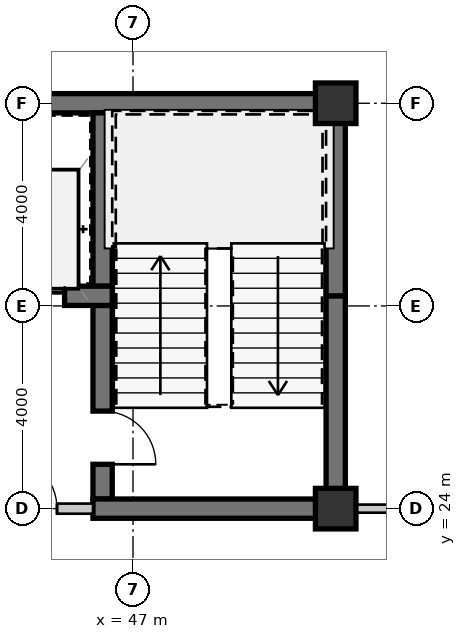
"""IFC4 building model, lengths in metres.
Left out: names, types, materials, properties, quantities, classifications, styles, units other than length and angle.
Written with IfcOpenShell. Run it as: python <this file> out.ifc"""

import sys

from ifc_helpers import new_model, si_unit, direction, frame, frame_2d, origin, origin_2d, place, context, subcontext, project, spatial, rectangle, extrude, source, transform, mapped, element, fill, save


model = new_model("IFC4")
c1 = context("Model", 3, precision=1e-05, world=origin(), true_north=direction((0.0, 1.0)))
c2 = subcontext(c1, "Body", "Model", "MODEL_VIEW")
j1 = project(units=[si_unit("LENGTHUNIT", "METRE"), si_unit("PLANEANGLEUNIT", "RADIAN")], contexts=[c1])
p1 = place(None, origin())
s1 = spatial("IfcSite", under=j1, at=p1, CompositionType="ELEMENT")
p2 = place(p1, origin())
s2 = spatial("IfcBuilding", under=s1, at=p2, CompositionType="ELEMENT")
p3 = place(p2, frame((0.0, 0.0, 57.75)))
s3 = spatial("IfcBuildingStorey", under=s2, at=p3, CompositionType="ELEMENT", Elevation=57.75)
m1 = source(origin(), c2, "Body", "SweptSolid", [
    extrude(rectangle(XDim=0.8, YDim=0.8, at=origin_2d()), origin(), (0.0, 0.0, 1.0), 3.15),
])
for number, where, z_axis, x_axis in (
    (1, (51.0, 24.0, 0.0), (0.0, 0.0, 1.0), (1.0, 0.0, 0.0)),
    (2, (51.0, 32.0, 0.0), (0.0, 0.0, 1.0), (1.0, 0.0, 0.0)),
):
    element("IfcColumn", number, at=place(p3, frame(where, z_axis=z_axis, x_axis=x_axis)), inside=s3, PredefinedType="COLUMN", context=c2, shape_type="MappedRepresentation", body=[
        mapped(m1, transform((0.0, 0.0, 0.0), scale=1.0)),
    ])
m2 = source(origin(), c2, "Body", "SweptSolid", [
    extrude(rectangle(XDim=11.99, YDim=0.38, at=frame_2d((5.995, 0.0))), origin(), (0.0, 0.0, 1.0), 2.87),
])
p4 = place(p3, frame((39.2, 32.0, 0.0), z_axis=(0.0, 0.0, 1.0), x_axis=(1.0, 0.0, 0.0)))
e3 = element("IfcWall", 3, at=p4, inside=s3, PredefinedType="SHEAR", context=c2, shape_type="MappedRepresentation", body=[
    mapped(m2, transform((0.0, 0.0, 0.0), scale=1.0)),
])
m3 = source(origin(), c2, "Body", "SweptSolid", [
    extrude(rectangle(XDim=4.01, YDim=0.38, at=frame_2d((2.005, 0.0))), origin(), (0.0, 0.0, 1.0), 2.87),
])
p5 = place(p3, frame((51.0, 24.19, 0.0), z_axis=(0.0, 0.0, 1.0), x_axis=(0.0, 1.0, 0.0)))
e4 = element("IfcWall", 4, at=p5, inside=s3, PredefinedType="SHEAR", context=c2, shape_type="MappedRepresentation", body=[
    mapped(m3, transform((0.0, 0.0, 0.0), scale=1.0)),
])
m4 = source(origin(), c2, "Body", "SweptSolid", [
    extrude(rectangle(XDim=3.61, YDim=0.38, at=frame_2d((1.805, 0.0))), origin(), (0.0, 0.0, 1.0), 2.87),
])
p6 = place(p3, frame((51.0, 28.2, 0.0), z_axis=(0.0, 0.0, 1.0), x_axis=(0.0, 1.0, 0.0)))
e5 = element("IfcWall", 5, at=p6, inside=s3, PredefinedType="SHEAR", context=c2, shape_type="MappedRepresentation", body=[
    mapped(m4, transform((0.0, 0.0, 0.0), scale=1.0)),
])
m5 = source(origin(), c2, "Body", "SweptSolid", [
    extrude(rectangle(XDim=3.42, YDim=0.38, at=frame_2d((1.71, 0.0))), origin(), (0.0, 0.0, 1.0), 2.87),
])
p7 = place(p3, frame((46.4, 31.81, 0.0), z_axis=(0.0, 0.0, 1.0), x_axis=(0.0, -1.0, 0.0)))
e6 = element("IfcWall", 6, at=p7, inside=s3, PredefinedType="SHEAR", context=c2, shape_type="MappedRepresentation", body=[
    mapped(m5, transform((0.0, 0.0, 0.0), scale=1.0)),
])
m6 = source(origin(), c2, "Body", "SweptSolid", [
    extrude(rectangle(XDim=3.82, YDim=0.38, at=frame_2d((1.91, 0.0))), origin(), (0.0, 0.0, 1.0), 2.87),
])
p8 = place(p3, frame((46.4, 28.01, 0.0), z_axis=(0.0, 0.0, 1.0), x_axis=(0.0, -1.0, 0.0)))
e7 = element("IfcWall", 7, at=p8, inside=s3, PredefinedType="SHEAR", context=c2, shape_type="MappedRepresentation", body=[
    mapped(m6, transform((0.0, 0.0, 0.0), scale=1.0)),
])
m7 = source(origin(), c2, "Body", "SweptSolid", [
    extrude(rectangle(XDim=1.05, YDim=2.1, at=frame_2d((0.525, 1.05))), frame((0.0, 0.2, 0.0), z_axis=(0.0, -1.0, 0.0), x_axis=(1.0, 0.0, 0.0)), (0.0, 0.0, 1.0), 0.4),
])
p9 = place(p8, frame((2.085, 0.0, 0.0)))
e8 = element("IfcOpeningElement", 8, at=p9, cuts=e7, PredefinedType="OPENING", context=c2, shape_type="MappedRepresentation", body=[
    mapped(m7, transform((0.0, 0.0, 0.0), scale=1.0)),
])
m8 = source(origin(), c2, "Body", "SweptSolid", [
    extrude(rectangle(XDim=4.98, YDim=0.38, at=frame_2d((2.49, 0.0))), origin(), (0.0, 0.0, 1.0), 2.87),
])
p10 = place(p3, frame((46.21, 24.0, 0.0), z_axis=(0.0, 0.0, 1.0), x_axis=(1.0, 0.0, 0.0)))
e9 = element("IfcWall", 9, at=p10, inside=s3, PredefinedType="SHEAR", context=c2, shape_type="MappedRepresentation", body=[
    mapped(m8, transform((0.0, 0.0, 0.0), scale=1.0)),
])
m9 = source(origin(), c2, "Body", "SweptSolid", [
    extrude(rectangle(XDim=2.98, YDim=0.38, at=frame_2d((1.49, 0.0))), origin(), (0.0, 0.0, 1.0), 2.87),
])
p11 = place(p3, frame((43.61, 28.2, 0.0), z_axis=(0.0, 0.0, 1.0), x_axis=(1.0, 0.0, 0.0)))
e10 = element("IfcWall", 10, at=p11, inside=s3, PredefinedType="SHEAR", context=c2, shape_type="MappedRepresentation", body=[
    mapped(m9, transform((0.0, 0.0, 0.0), scale=1.0)),
])
m10 = source(origin(), c2, "Body", "SweptSolid", [
    extrude(rectangle(XDim=1.1, YDim=2.15, at=frame_2d((0.55, 1.075))), frame((0.0, 0.2, 0.0), z_axis=(0.0, -1.0, 0.0), x_axis=(1.0, 0.0, 0.0)), (0.0, 0.0, 1.0), 0.4),
])
p12 = place(p11, frame((0.94, 0.0, 0.0)))
e11 = element("IfcOpeningElement", 11, at=p12, cuts=e10, PredefinedType="OPENING", context=c2, shape_type="MappedRepresentation", body=[
    mapped(m10, transform((0.0, 0.0, 0.0), scale=1.0)),
])
m11 = source(origin(), c2, "Body", "SweptSolid", [
    extrude(rectangle(XDim=2.66, YDim=0.2, at=frame_2d((1.33, 0.0))), origin(), (0.0, 0.0, 1.0), 2.337),
])
p13 = place(p3, frame((43.55, 24.0, 0.0), z_axis=(0.0, 0.0, 1.0), x_axis=(1.0, 0.0, 0.0)))
e12 = element("IfcWall", 12, at=p13, inside=s3, PredefinedType="SOLIDWALL", context=c2, shape_type="MappedRepresentation", body=[
    mapped(m11, transform((0.0, 0.0, 0.0), scale=1.0)),
])
m12 = source(origin(), c2, "Body", "SweptSolid", [
    extrude(rectangle(XDim=1.05, YDim=2.1, at=frame_2d((0.525, 1.05))), frame((0.0, 0.11, 0.0), z_axis=(0.0, -1.0, 0.0), x_axis=(1.0, 0.0, 0.0)), (0.0, 0.0, 1.0), 0.22),
])
p14 = place(p13, frame((0.9, 0.0, 0.0)))
e13 = element("IfcOpeningElement", 13, at=p14, cuts=e12, PredefinedType="OPENING", context=c2, shape_type="MappedRepresentation", body=[
    mapped(m12, transform((0.0, 0.0, 0.0), scale=1.0)),
])
m13 = source(origin(), c2, "Body", "SweptSolid", [
    extrude(rectangle(XDim=4.13, YDim=0.16, at=frame_2d((2.065, 0.0))), origin(), (0.0, 0.0, 1.0), 2.87),
])
p15 = place(p3, frame((51.19, 24.0, 0.0), z_axis=(0.0, 0.0, 1.0), x_axis=(1.0, 0.0, 0.0)))
e14 = element("IfcWall", 14, at=p15, inside=s3, PredefinedType="PARTITIONING", context=c2, shape_type="MappedRepresentation", body=[
    mapped(m13, transform((0.0, 0.0, 0.0), scale=1.0)),
])
m14 = source(origin(), c2, "Body", "SweptSolid", [
    extrude(rectangle(XDim=1.05, YDim=2.1, at=frame_2d((0.525, 1.05))), frame((0.0, 0.025, 0.0), z_axis=(0.0, -1.0, 0.0), x_axis=(1.0, 0.0, 0.0)), (0.0, 0.0, 1.0), 0.05),
])
p16 = place(p9, origin())
e15 = element("IfcDoor", 15, at=p16, inside=s3, OperationType="SINGLE_SWING_RIGHT", PredefinedType="DOOR", context=c2, shape_type="MappedRepresentation", body=[
    mapped(m14, transform((0.0, 0.0, 0.0), scale=1.0)),
])
fill(e8, e15)
m15 = source(origin(), c2, "Body", "SweptSolid", [
    extrude(rectangle(XDim=1.1, YDim=2.15, at=frame_2d((0.55, 1.075))), frame((0.0, 0.025, 0.0), z_axis=(0.0, -1.0, 0.0), x_axis=(1.0, 0.0, 0.0)), (0.0, 0.0, 1.0), 0.05),
])
p17 = place(p12, origin())
e16 = element("IfcDoor", 16, at=p17, inside=s3, OperationType="SLIDING_TO_LEFT", PredefinedType="DOOR", context=c2, shape_type="MappedRepresentation", body=[
    mapped(m15, transform((0.0, 0.0, 0.0), scale=1.0)),
])
fill(e11, e16)
p18 = place(p14, origin())
e17 = element("IfcDoor", 17, at=p18, inside=s3, OperationType="SINGLE_SWING_LEFT", PredefinedType="DOOR", context=c2, shape_type="MappedRepresentation", body=[
    mapped(m14, transform((0.0, 0.0, 0.0), scale=1.0)),
])
fill(e13, e17)
save(model, sys.argv[1])
